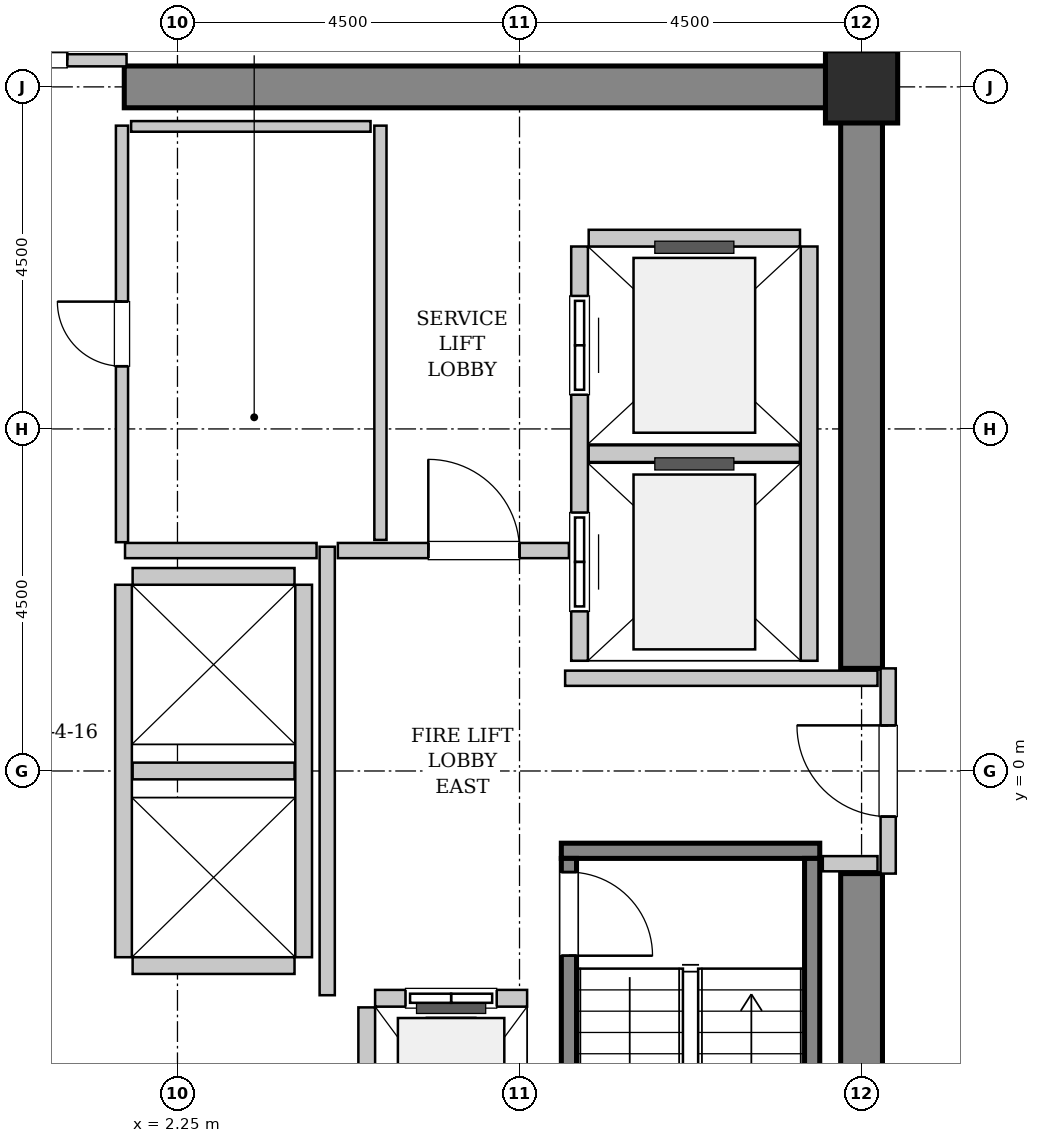
"""IFC4 building model, lengths in metres.
Left out: names, types, materials, properties, quantities, classifications, styles, units other than length and angle.
Written with IfcOpenShell. Run it as: python <this file> out.ifc"""

import sys

from ifc_helpers import new_model, si_unit, direction, frame, frame_2d, origin, origin_2d, place, context, subcontext, project, spatial, rectangle, hollow_rectangle, extrude, source, transform, mapped, element, fill, save


model = new_model("IFC4")
c1 = context("Model", 3, precision=1e-05, world=origin(), true_north=direction((0.0, 1.0)))
c2 = subcontext(c1, "Body", "Model", "MODEL_VIEW")
j1 = project(units=[si_unit("LENGTHUNIT", "METRE"), si_unit("PLANEANGLEUNIT", "RADIAN")], contexts=[c1])
p1 = place(None, origin())
s1 = spatial("IfcSite", under=j1, at=p1, CompositionType="ELEMENT")
p2 = place(p1, origin())
s2 = spatial("IfcBuilding", under=s1, at=p2, CompositionType="ELEMENT")
p3 = place(p2, frame((0.0, 0.0, 160.2)))
s3 = spatial("IfcBuildingStorey", under=s2, at=p3, CompositionType="ELEMENT", Elevation=160.2)
m1 = source(origin(), c2, "Body", "SweptSolid", [
    extrude(rectangle(XDim=9.975, YDim=0.55, at=frame_2d((4.987, 0.0))), origin(), (0.0, 0.0, 1.0), 3.8),
])
p4 = place(p3, frame((1.55, 9.0, 0.0), z_axis=(0.0, 0.0, 1.0), x_axis=(1.0, 0.0, 0.0)))
e1 = element("IfcWall", 1, at=p4, inside=s3, PredefinedType="SHEAR", context=c2, shape_type="MappedRepresentation", body=[
    mapped(m1, transform((0.0, 0.0, 0.0), x_axis=(1.0, 0.0, 0.0), y_axis=(0.0, 1.0, 0.0), z_axis=(0.0, 0.0, 1.0), scale=1.0)),
])
m2 = source(origin(), c2, "Body", "SweptSolid", [
    extrude(rectangle(XDim=7.375, YDim=0.55, at=frame_2d((3.688, 0.0))), origin(), (0.0, 0.0, 1.0), 3.8),
])
for number, where, z_axis, x_axis in (
    (2, (11.25, -8.725, 0.0), (0.0, 0.0, 1.0), (0.0, 1.0, 0.0)),
    (3, (11.25, 1.35, 0.0), (0.0, 0.0, 1.0), (0.0, 1.0, 0.0)),
):
    element("IfcWall", number, at=place(p3, frame(where, z_axis=z_axis, x_axis=x_axis)), inside=s3, PredefinedType="SHEAR", context=c2, shape_type="MappedRepresentation", body=[
        mapped(m2, transform((0.0, 0.0, 0.0), x_axis=(1.0, 0.0, 0.0), y_axis=(0.0, 1.0, 0.0), z_axis=(0.0, 0.0, 1.0), scale=1.0)),
    ])
m3 = source(origin(), c2, "Body", "SweptSolid", [
    extrude(hollow_rectangle(XDim=0.95, YDim=0.95, WallThickness=0.045, InnerFilletRadius=0.045, OuterFilletRadius=0.09, at=origin_2d()), origin(), (0.0, 0.0, 1.0), 3.8),
])
p5 = place(p3, frame((11.25, 9.0, 0.0), z_axis=(0.0, 0.0, 1.0), x_axis=(1.0, 0.0, 0.0)))
e4 = element("IfcColumn", 4, at=p5, inside=s3, PredefinedType="COLUMN", context=c2, shape_type="MappedRepresentation", body=[
    mapped(m3, transform((0.0, 0.0, 0.0), x_axis=(1.0, 0.0, 0.0), y_axis=(0.0, 1.0, 0.0), z_axis=(0.0, 0.0, 1.0), scale=1.0)),
])
m4 = source(origin(), c2, "Body", "SweptSolid", [
    extrude(rectangle(XDim=3.4, YDim=0.2, at=frame_2d((1.7, 0.0))), origin(), (0.0, 0.0, 1.0), 3.8),
])
p6 = place(p3, frame((7.3, -1.05, 0.0), z_axis=(0.0, 0.0, 1.0), x_axis=(1.0, 0.0, 0.0)))
e5 = element("IfcWall", 5, at=p6, inside=s3, PredefinedType="SOLIDWALL", context=c2, shape_type="MappedRepresentation", body=[
    mapped(m4, transform((0.0, 0.0, 0.0), x_axis=(1.0, 0.0, 0.0), y_axis=(0.0, 1.0, 0.0), z_axis=(0.0, 0.0, 1.0), scale=1.0)),
])
m5 = source(origin(), c2, "Body", "SweptSolid", [
    extrude(rectangle(XDim=7.1, YDim=0.2, at=frame_2d((3.55, 0.0))), origin(), (0.0, 0.0, 1.0), 3.8),
])
p7 = place(p3, frame((7.4, -1.15, 0.0), z_axis=(0.0, 0.0, 1.0), x_axis=(0.0, -1.0, 0.0)))
e6 = element("IfcWall", 6, at=p7, inside=s3, PredefinedType="SOLIDWALL", context=c2, shape_type="MappedRepresentation", body=[
    mapped(m5, transform((0.0, 0.0, 0.0), x_axis=(1.0, 0.0, 0.0), y_axis=(0.0, 1.0, 0.0), z_axis=(0.0, 0.0, 1.0), scale=1.0)),
])
p8 = place(p7, frame((0.18, 0.0, 0.0)))
e7 = element("IfcOpeningElement", 7, at=p8, cuts=e6, PredefinedType="OPENING", context=c2, shape_type="SweptSolid", body=[
    extrude(rectangle(XDim=1.1, YDim=2.15, at=frame_2d((0.55, 1.075))), frame((0.0, 0.11, 0.0), z_axis=(0.0, -1.0, 0.0), x_axis=(1.0, 0.0, 0.0)), (0.0, 0.0, 1.0), 0.22),
])
p9 = place(p3, frame((10.6, -1.15, 0.0), z_axis=(0.0, 0.0, 1.0), x_axis=(0.0, -1.0, 0.0)))
e8 = element("IfcWall", 8, at=p9, inside=s3, PredefinedType="SOLIDWALL", context=c2, shape_type="MappedRepresentation", body=[
    mapped(m5, transform((0.0, 0.0, 0.0), x_axis=(1.0, 0.0, 0.0), y_axis=(0.0, 1.0, 0.0), z_axis=(0.0, 0.0, 1.0), scale=1.0)),
])
m6 = source(origin(), c2, "Body", "SweptSolid", [
    extrude(rectangle(XDim=2.0, YDim=0.22, at=frame_2d((1.0, 0.0))), origin(), (0.0, 0.0, 1.0), 3.535),
])
p10 = place(p3, frame((6.85, -2.99, 0.0), z_axis=(0.0, 0.0, 1.0), x_axis=(-1.0, 0.0, 0.0)))
e9 = element("IfcWall", 9, at=p10, inside=s3, PredefinedType="SOLIDWALL", context=c2, shape_type="MappedRepresentation", body=[
    mapped(m6, transform((0.0, 0.0, 0.0), x_axis=(1.0, 0.0, 0.0), y_axis=(0.0, 1.0, 0.0), z_axis=(0.0, 0.0, 1.0), scale=1.0)),
])
p11 = place(p10, frame((0.4, 0.0, 0.0)))
e10 = element("IfcOpeningElement", 10, at=p11, cuts=e9, PredefinedType="OPENING", context=c2, shape_type="SweptSolid", body=[
    extrude(rectangle(XDim=1.2, YDim=2.2, at=frame_2d((0.6, 1.1))), frame((0.0, 0.12, 0.0), z_axis=(0.0, -1.0, 0.0), x_axis=(1.0, 0.0, 0.0)), (0.0, 0.0, 1.0), 0.24),
])
m7 = source(origin(), c2, "Body", "SweptSolid", [
    extrude(rectangle(XDim=2.68, YDim=0.22, at=frame_2d((1.34, 0.0))), origin(), (0.0, 0.0, 1.0), 3.535),
])
p12 = place(p3, frame((4.74, -3.11, 0.0), z_axis=(0.0, 0.0, 1.0), x_axis=(0.0, -1.0, 0.0)))
e11 = element("IfcWall", 11, at=p12, inside=s3, PredefinedType="SOLIDWALL", context=c2, shape_type="MappedRepresentation", body=[
    mapped(m7, transform((0.0, 0.0, 0.0), x_axis=(1.0, 0.0, 0.0), y_axis=(0.0, 1.0, 0.0), z_axis=(0.0, 0.0, 1.0), scale=1.0)),
])
m8 = source(origin(), c2, "Body", "SweptSolid", [
    extrude(rectangle(XDim=5.45, YDim=0.22, at=frame_2d((2.725, 0.0))), origin(), (0.0, 0.0, 1.0), 3.535),
])
p13 = place(p3, frame((7.54, 6.9, 0.0), z_axis=(0.0, 0.0, 1.0), x_axis=(0.0, -1.0, 0.0)))
e12 = element("IfcWall", 12, at=p13, inside=s3, PredefinedType="SOLIDWALL", context=c2, shape_type="MappedRepresentation", body=[
    mapped(m8, transform((0.0, 0.0, 0.0), x_axis=(1.0, 0.0, 0.0), y_axis=(0.0, 1.0, 0.0), z_axis=(0.0, 0.0, 1.0), scale=1.0)),
])
p14 = place(p13, frame((3.5, 0.0, 0.0)))
e13 = element("IfcOpeningElement", 13, at=p14, cuts=e12, PredefinedType="OPENING", context=c2, shape_type="SweptSolid", body=[
    extrude(rectangle(XDim=1.3, YDim=2.3, at=frame_2d((0.65, 1.15))), frame((0.0, 0.12, 0.0), z_axis=(0.0, -1.0, 0.0), x_axis=(1.0, 0.0, 0.0)), (0.0, 0.0, 1.0), 0.24),
])
p15 = place(p13, frame((0.65, 0.0, 0.0)))
e14 = element("IfcOpeningElement", 14, at=p15, cuts=e12, PredefinedType="OPENING", context=c2, shape_type="SweptSolid", body=[
    extrude(rectangle(XDim=1.3, YDim=2.3, at=frame_2d((0.65, 1.15))), frame((0.0, 0.12, 0.0), z_axis=(0.0, -1.0, 0.0), x_axis=(1.0, 0.0, 0.0)), (0.0, 0.0, 1.0), 0.24),
])
p16 = place(p3, frame((10.56, 1.45, 0.0), z_axis=(0.0, 0.0, 1.0), x_axis=(0.0, 1.0, 0.0)))
e15 = element("IfcWall", 15, at=p16, inside=s3, PredefinedType="SOLIDWALL", context=c2, shape_type="MappedRepresentation", body=[
    mapped(m8, transform((0.0, 0.0, 0.0), x_axis=(1.0, 0.0, 0.0), y_axis=(0.0, 1.0, 0.0), z_axis=(0.0, 0.0, 1.0), scale=1.0)),
])
m9 = source(origin(), c2, "Body", "SweptSolid", [
    extrude(rectangle(XDim=2.78, YDim=0.22, at=frame_2d((1.39, 0.0))), origin(), (0.0, 0.0, 1.0), 3.535),
])
for number, where, z_axis, x_axis in (
    (16, (7.66, 4.175, 0.0), (0.0, 0.0, 1.0), (1.0, 0.0, 0.0)),
    (17, (10.44, 7.01, 0.0), (0.0, 0.0, 1.0), (-1.0, 0.0, 0.0)),
):
    element("IfcWall", number, at=place(p3, frame(where, z_axis=z_axis, x_axis=x_axis)), inside=s3, PredefinedType="SOLIDWALL", context=c2, shape_type="MappedRepresentation", body=[
        mapped(m9, transform((0.0, 0.0, 0.0), x_axis=(1.0, 0.0, 0.0), y_axis=(0.0, 1.0, 0.0), z_axis=(0.0, 0.0, 1.0), scale=1.0)),
    ])
m10 = source(origin(), c2, "Body", "SweptSolid", [
    extrude(rectangle(XDim=4.9, YDim=0.22, at=frame_2d((2.45, 0.0))), origin(), (0.0, 0.0, 1.0), 3.535),
])
for number, where, z_axis, x_axis in (
    (18, (1.54, 2.45, 0.0), (0.0, 0.0, 1.0), (0.0, -1.0, 0.0)),
    (19, (3.91, -2.45, 0.0), (0.0, 0.0, 1.0), (0.0, 1.0, 0.0)),
):
    element("IfcWall", number, at=place(p3, frame(where, z_axis=z_axis, x_axis=x_axis)), inside=s3, PredefinedType="SOLIDWALL", context=c2, shape_type="MappedRepresentation", body=[
        mapped(m10, transform((0.0, 0.0, 0.0), x_axis=(1.0, 0.0, 0.0), y_axis=(0.0, 1.0, 0.0), z_axis=(0.0, 0.0, 1.0), scale=1.0)),
    ])
m11 = source(origin(), c2, "Body", "SweptSolid", [
    extrude(rectangle(XDim=2.13, YDim=0.22, at=frame_2d((1.065, 0.0))), origin(), (0.0, 0.0, 1.0), 3.535),
])
for number, where, z_axis, x_axis in (
    (20, (1.66, -2.56, 0.0), (0.0, 0.0, 1.0), (1.0, 0.0, 0.0)),
    (21, (1.66, 0.0, 0.0), (0.0, 0.0, 1.0), (1.0, 0.0, 0.0)),
    (22, (3.79, 2.56, 0.0), (0.0, 0.0, 1.0), (-1.0, 0.0, 0.0)),
):
    element("IfcWall", number, at=place(p3, frame(where, z_axis=z_axis, x_axis=x_axis)), inside=s3, PredefinedType="SOLIDWALL", context=c2, shape_type="MappedRepresentation", body=[
        mapped(m11, transform((0.0, 0.0, 0.0), x_axis=(1.0, 0.0, 0.0), y_axis=(0.0, 1.0, 0.0), z_axis=(0.0, 0.0, 1.0), scale=1.0)),
    ])
m12 = source(origin(), c2, "Body", "SweptSolid", [
    extrude(rectangle(XDim=2.7, YDim=0.2, at=frame_2d((1.35, 0.0))), origin(), (0.0, 0.0, 1.0), 2.425),
])
p17 = place(p3, frame((11.6, -1.35, 0.0), z_axis=(0.0, 0.0, 1.0), x_axis=(0.0, 1.0, 0.0)))
e23 = element("IfcWall", 23, at=p17, inside=s3, PredefinedType="PARTITIONING", context=c2, shape_type="MappedRepresentation", body=[
    mapped(m12, transform((0.0, 0.0, 0.0), x_axis=(1.0, 0.0, 0.0), y_axis=(0.0, 1.0, 0.0), z_axis=(0.0, 0.0, 1.0), scale=1.0)),
])
p18 = place(p17, frame((0.75, 0.0, 0.0)))
e24 = element("IfcOpeningElement", 24, at=p18, cuts=e23, PredefinedType="OPENING", context=c2, shape_type="SweptSolid", body=[
    extrude(rectangle(XDim=1.2, YDim=2.15, at=frame_2d((0.6, 1.075))), frame((0.0, 0.11, 0.0), z_axis=(0.0, -1.0, 0.0), x_axis=(1.0, 0.0, 0.0)), (0.0, 0.0, 1.0), 0.22),
])
m13 = source(origin(), c2, "Body", "SweptSolid", [
    extrude(rectangle(XDim=5.9, YDim=0.2, at=frame_2d((2.95, 0.0))), origin(), (0.0, 0.0, 1.0), 3.535),
])
p19 = place(p3, frame((4.22, -2.95, 0.0), z_axis=(0.0, 0.0, 1.0), x_axis=(0.0, 1.0, 0.0)))
e25 = element("IfcWall", 25, at=p19, inside=s3, PredefinedType="PARTITIONING", context=c2, shape_type="MappedRepresentation", body=[
    mapped(m13, transform((0.0, 0.0, 0.0), x_axis=(1.0, 0.0, 0.0), y_axis=(0.0, 1.0, 0.0), z_axis=(0.0, 0.0, 1.0), scale=1.0)),
])
m14 = source(origin(), c2, "Body", "SweptSolid", [
    extrude(rectangle(XDim=2.52, YDim=0.2, at=frame_2d((1.26, 0.0))), origin(), (0.0, 0.0, 1.0), 3.535),
])
p20 = place(p3, frame((1.56, 2.9, 0.0), z_axis=(0.0, 0.0, 1.0), x_axis=(1.0, 0.0, 0.0)))
e26 = element("IfcWall", 26, at=p20, inside=s3, PredefinedType="PARTITIONING", context=c2, shape_type="MappedRepresentation", body=[
    mapped(m14, transform((0.0, 0.0, 0.0), x_axis=(1.0, 0.0, 0.0), y_axis=(0.0, 1.0, 0.0), z_axis=(0.0, 0.0, 1.0), scale=1.0)),
])
m15 = source(origin(), c2, "Body", "SweptSolid", [
    extrude(rectangle(XDim=3.04, YDim=0.2, at=frame_2d((1.52, 0.0))), origin(), (0.0, 0.0, 1.0), 3.535),
])
p21 = place(p3, frame((4.36, 2.9, 0.0), z_axis=(0.0, 0.0, 1.0), x_axis=(1.0, 0.0, 0.0)))
e27 = element("IfcWall", 27, at=p21, inside=s3, PredefinedType="PARTITIONING", context=c2, shape_type="MappedRepresentation", body=[
    mapped(m15, transform((0.0, 0.0, 0.0), x_axis=(1.0, 0.0, 0.0), y_axis=(0.0, 1.0, 0.0), z_axis=(0.0, 0.0, 1.0), scale=1.0)),
])
p22 = place(p21, frame((1.19, 0.0, 0.0)))
e28 = element("IfcOpeningElement", 28, at=p22, cuts=e27, PredefinedType="OPENING", context=c2, shape_type="SweptSolid", body=[
    extrude(rectangle(XDim=1.2, YDim=2.15, at=frame_2d((0.6, 1.075))), frame((0.0, 0.11, 0.0), z_axis=(0.0, -1.0, 0.0), x_axis=(1.0, 0.0, 0.0)), (0.0, 0.0, 1.0), 0.22),
])
m16 = source(origin(), c2, "Body", "SweptSolid", [
    extrude(rectangle(XDim=4.11, YDim=0.2, at=frame_2d((2.055, 0.0))), origin(), (0.0, 0.0, 1.0), 3.535),
])
p23 = place(p3, frame((7.35, 1.22, 0.0), z_axis=(0.0, 0.0, 1.0), x_axis=(1.0, 0.0, 0.0)))
e29 = element("IfcWall", 29, at=p23, inside=s3, PredefinedType="PARTITIONING", context=c2, shape_type="MappedRepresentation", body=[
    mapped(m16, transform((0.0, 0.0, 0.0), x_axis=(1.0, 0.0, 0.0), y_axis=(0.0, 1.0, 0.0), z_axis=(0.0, 0.0, 1.0), scale=1.0)),
])
m17 = source(origin(), c2, "Body", "SweptSolid", [
    extrude(rectangle(XDim=0.72, YDim=0.2, at=frame_2d((0.36, 0.0))), origin(), (0.0, 0.0, 1.0), 3.535),
])
p24 = place(p3, frame((10.74, -1.22, 0.0), z_axis=(0.0, 0.0, 1.0), x_axis=(1.0, 0.0, 0.0)))
e30 = element("IfcWall", 30, at=p24, inside=s3, PredefinedType="PARTITIONING", context=c2, shape_type="MappedRepresentation", body=[
    mapped(m17, transform((0.0, 0.0, 0.0), x_axis=(1.0, 0.0, 0.0), y_axis=(0.0, 1.0, 0.0), z_axis=(0.0, 0.0, 1.0), scale=1.0)),
])
m18 = source(origin(), c2, "Body", "SweptSolid", [
    extrude(rectangle(XDim=3.16, YDim=0.16, at=frame_2d((1.58, 0.0))), origin(), (0.0, 0.0, 1.0), 2.425),
])
p25 = place(p3, frame((-1.58, 9.35, 0.0), z_axis=(0.0, 0.0, 1.0), x_axis=(1.0, 0.0, 0.0)))
e31 = element("IfcWall", 31, at=p25, inside=s3, PredefinedType="PARTITIONING", context=c2, shape_type="MappedRepresentation", body=[
    mapped(m18, transform((0.0, 0.0, 0.0), x_axis=(1.0, 0.0, 0.0), y_axis=(0.0, 1.0, 0.0), z_axis=(0.0, 0.0, 1.0), scale=1.0)),
])
p26 = place(p25, frame((0.78, 0.0, 0.0)))
e32 = element("IfcOpeningElement", 32, at=p26, cuts=e31, PredefinedType="OPENING", context=c2, shape_type="SweptSolid", body=[
    extrude(rectangle(XDim=1.6, YDim=2.3, at=frame_2d((0.8, 1.15))), frame((0.0, 0.09, 0.0), z_axis=(0.0, -1.0, 0.0), x_axis=(1.0, 0.0, 0.0)), (0.0, 0.0, 1.0), 0.18),
])
m19 = source(origin(), c2, "Body", "SweptSolid", [
    extrude(rectangle(XDim=5.45, YDim=0.16, at=frame_2d((2.725, 0.0))), origin(), (0.0, 0.0, 1.0), 3.535),
])
p27 = place(p3, frame((4.92, 3.04, 0.0), z_axis=(0.0, 0.0, 1.0), x_axis=(0.0, 1.0, 0.0)))
e33 = element("IfcWall", 33, at=p27, inside=s3, PredefinedType="PARTITIONING", context=c2, shape_type="MappedRepresentation", body=[
    mapped(m19, transform((0.0, 0.0, 0.0), x_axis=(1.0, 0.0, 0.0), y_axis=(0.0, 1.0, 0.0), z_axis=(0.0, 0.0, 1.0), scale=1.0)),
])
m20 = source(origin(), c2, "Body", "SweptSolid", [
    extrude(rectangle(XDim=5.48, YDim=0.16, at=frame_2d((2.74, 0.0))), origin(), (0.0, 0.0, 1.0), 3.535),
])
p28 = place(p3, frame((1.52, 3.01, 0.0), z_axis=(0.0, 0.0, 1.0), x_axis=(0.0, 1.0, 0.0)))
e34 = element("IfcWall", 34, at=p28, inside=s3, PredefinedType="PARTITIONING", context=c2, shape_type="MappedRepresentation", body=[
    mapped(m20, transform((0.0, 0.0, 0.0), x_axis=(1.0, 0.0, 0.0), y_axis=(0.0, 1.0, 0.0), z_axis=(0.0, 0.0, 1.0), scale=1.0)),
])
p29 = place(p28, frame((2.315, 0.0, 0.0)))
e35 = element("IfcOpeningElement", 35, at=p29, cuts=e34, PredefinedType="OPENING", context=c2, shape_type="SweptSolid", body=[
    extrude(rectangle(XDim=0.85, YDim=2.1, at=frame_2d((0.425, 1.05))), frame((0.0, 0.09, 0.0), z_axis=(0.0, -1.0, 0.0), x_axis=(1.0, 0.0, 0.0)), (0.0, 0.0, 1.0), 0.18),
])
m21 = source(origin(), c2, "Body", "SweptSolid", [
    extrude(rectangle(XDim=3.15, YDim=0.14, at=frame_2d((1.575, 0.0))), origin(), (0.0, 0.0, 1.0), 3.535),
])
p30 = place(p3, frame((1.64, 8.48, 0.0), z_axis=(0.0, 0.0, 1.0), x_axis=(1.0, 0.0, 0.0)))
e36 = element("IfcWall", 36, at=p30, inside=s3, PredefinedType="PARTITIONING", context=c2, shape_type="MappedRepresentation", body=[
    mapped(m21, transform((0.0, 0.0, 0.0), x_axis=(1.0, 0.0, 0.0), y_axis=(0.0, 1.0, 0.0), z_axis=(0.0, 0.0, 1.0), scale=1.0)),
])
m22 = source(origin(), c2, "Body", "SweptSolid", [
    extrude(rectangle(XDim=1.1, YDim=2.15, at=frame_2d((0.55, 1.075))), frame((0.0, 0.025, 0.0), z_axis=(0.0, -1.0, 0.0), x_axis=(1.0, 0.0, 0.0)), (0.0, 0.0, 1.0), 0.05),
])
p31 = place(p8, origin())
e37 = element("IfcDoor", 37, at=p31, inside=s3, OperationType="SINGLE_SWING_RIGHT", PredefinedType="DOOR", context=c2, shape_type="MappedRepresentation", body=[
    mapped(m22, transform((0.0, 0.0, 0.0), x_axis=(1.0, 0.0, 0.0), y_axis=(0.0, 1.0, 0.0), z_axis=(0.0, 0.0, 1.0), scale=1.0)),
])
fill(e7, e37)
m23 = source(origin(), c2, "Body", "SweptSolid", [
    extrude(rectangle(XDim=1.2, YDim=2.2, at=frame_2d((0.6, 1.1))), frame((0.0, 0.025, 0.0), z_axis=(0.0, -1.0, 0.0), x_axis=(1.0, 0.0, 0.0)), (0.0, 0.0, 1.0), 0.05),
])
p32 = place(p11, origin())
e38 = element("IfcDoor", 38, at=p32, inside=s3, OperationType="SLIDING_TO_LEFT", PredefinedType="DOOR", context=c2, shape_type="MappedRepresentation", body=[
    mapped(m23, transform((0.0, 0.0, 0.0), x_axis=(1.0, 0.0, 0.0), y_axis=(0.0, 1.0, 0.0), z_axis=(0.0, 0.0, 1.0), scale=1.0)),
])
fill(e10, e38)
m24 = source(origin(), c2, "Body", "SweptSolid", [
    extrude(rectangle(XDim=1.3, YDim=2.3, at=frame_2d((0.65, 1.15))), frame((0.0, 0.025, 0.0), z_axis=(0.0, -1.0, 0.0), x_axis=(1.0, 0.0, 0.0)), (0.0, 0.0, 1.0), 0.05),
])
p33 = place(p14, origin())
e39 = element("IfcDoor", 39, at=p33, inside=s3, OperationType="SLIDING_TO_RIGHT", PredefinedType="DOOR", context=c2, shape_type="MappedRepresentation", body=[
    mapped(m24, transform((0.0, 0.0, 0.0), x_axis=(1.0, 0.0, 0.0), y_axis=(0.0, 1.0, 0.0), z_axis=(0.0, 0.0, 1.0), scale=1.0)),
])
fill(e13, e39)
p34 = place(p15, origin())
e40 = element("IfcDoor", 40, at=p34, inside=s3, OperationType="SLIDING_TO_RIGHT", PredefinedType="DOOR", context=c2, shape_type="MappedRepresentation", body=[
    mapped(m24, transform((0.0, 0.0, 0.0), x_axis=(1.0, 0.0, 0.0), y_axis=(0.0, 1.0, 0.0), z_axis=(0.0, 0.0, 1.0), scale=1.0)),
])
fill(e14, e40)
m25 = source(origin(), c2, "Body", "SweptSolid", [
    extrude(rectangle(XDim=1.2, YDim=2.15, at=frame_2d((0.6, 1.075))), frame((0.0, 0.025, 0.0), z_axis=(0.0, -1.0, 0.0), x_axis=(1.0, 0.0, 0.0)), (0.0, 0.0, 1.0), 0.05),
])
p35 = place(p18, origin())
e41 = element("IfcDoor", 41, at=p35, inside=s3, OperationType="SINGLE_SWING_RIGHT", PredefinedType="DOOR", context=c2, shape_type="MappedRepresentation", body=[
    mapped(m25, transform((0.0, 0.0, 0.0), x_axis=(1.0, 0.0, 0.0), y_axis=(0.0, 1.0, 0.0), z_axis=(0.0, 0.0, 1.0), scale=1.0)),
])
fill(e24, e41)
p36 = place(p22, origin())
e42 = element("IfcDoor", 42, at=p36, inside=s3, OperationType="SINGLE_SWING_LEFT", PredefinedType="DOOR", context=c2, shape_type="MappedRepresentation", body=[
    mapped(m25, transform((0.0, 0.0, 0.0), x_axis=(1.0, 0.0, 0.0), y_axis=(0.0, 1.0, 0.0), z_axis=(0.0, 0.0, 1.0), scale=1.0)),
])
fill(e28, e42)
m26 = source(origin(), c2, "Body", "SweptSolid", [
    extrude(rectangle(XDim=1.6, YDim=2.3, at=frame_2d((0.8, 1.15))), frame((0.0, 0.025, 0.0), z_axis=(0.0, -1.0, 0.0), x_axis=(1.0, 0.0, 0.0)), (0.0, 0.0, 1.0), 0.05),
])
p37 = place(p26, origin())
e43 = element("IfcDoor", 43, at=p37, inside=s3, OperationType="DOUBLE_DOOR_SINGLE_SWING", PredefinedType="DOOR", context=c2, shape_type="MappedRepresentation", body=[
    mapped(m26, transform((0.0, 0.0, 0.0), x_axis=(1.0, 0.0, 0.0), y_axis=(0.0, 1.0, 0.0), z_axis=(0.0, 0.0, 1.0), scale=1.0)),
])
fill(e32, e43)
m27 = source(origin(), c2, "Body", "SweptSolid", [
    extrude(rectangle(XDim=0.85, YDim=2.1, at=frame_2d((0.425, 1.05))), frame((0.0, 0.025, 0.0), z_axis=(0.0, -1.0, 0.0), x_axis=(1.0, 0.0, 0.0)), (0.0, 0.0, 1.0), 0.05),
])
p38 = place(p29, origin())
e44 = element("IfcDoor", 44, at=p38, inside=s3, OperationType="SINGLE_SWING_RIGHT", PredefinedType="DOOR", context=c2, shape_type="MappedRepresentation", body=[
    mapped(m27, transform((0.0, 0.0, 0.0), x_axis=(1.0, 0.0, 0.0), y_axis=(0.0, 1.0, 0.0), z_axis=(0.0, 0.0, 1.0), scale=1.0)),
])
fill(e35, e44)
save(model, sys.argv[1])
